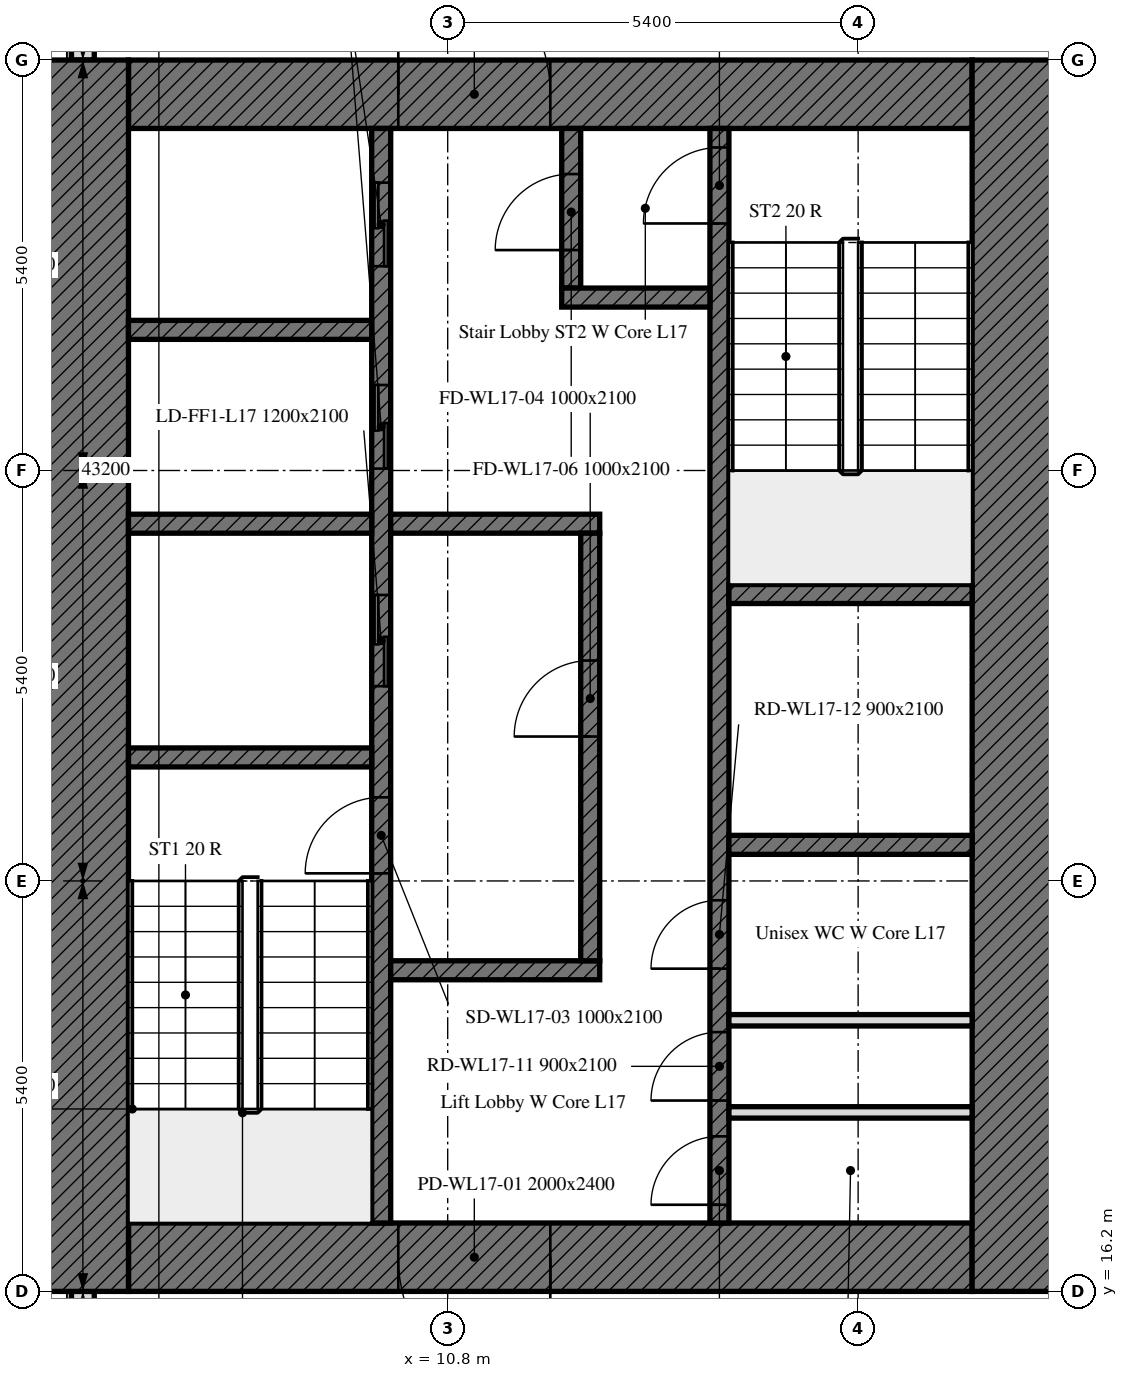
"""IFC4 building model, lengths in metres.
Left out: names, types, materials, properties, quantities, classifications, styles, units other than length and angle.
Written with IfcOpenShell. Run it as: python <this file> out.ifc"""

import sys

from ifc_helpers import new_model, si_unit, direction, frame, frame_2d, origin, place, context, subcontext, project, spatial, rectangle, extrude, element, fill, save


model = new_model("IFC4")
c1 = context("Model", 3, precision=1e-05, world=origin(), true_north=direction((0.0, 1.0)))
c2 = subcontext(c1, "Body", "Model", "MODEL_VIEW")
j1 = project(units=[si_unit("LENGTHUNIT", "METRE"), si_unit("PLANEANGLEUNIT", "RADIAN")], contexts=[c1])
p1 = place(None, origin())
s1 = spatial("IfcSite", under=j1, at=p1, CompositionType="ELEMENT")
p2 = place(p1, origin())
s2 = spatial("IfcBuilding", under=s1, at=p2, CompositionType="ELEMENT")
p3 = place(p2, frame((0.0, 0.0, 76.4)))
s3 = spatial("IfcBuildingStorey", under=s2, at=p3, CompositionType="ELEMENT", Elevation=76.4)
p4 = place(p3, frame((6.0, 43.014, 0.0), z_axis=(0.0, 0.0, 1.0), x_axis=(0.0, -1.0, 0.0)))
e1 = element("IfcWall", 1, at=p4, inside=s3, PredefinedType="SOLIDWALL", context=c2, shape_type="SweptSolid", body=[
    extrude(rectangle(XDim=10.614, YDim=0.3, at=frame_2d((5.307, 0.0))), origin(), (0.0, 0.0, 1.0), 3.5),
])
p5 = place(p4, frame((6.564, 0.0, 0.9)))
e2 = element("IfcOpeningElement", 2, at=p5, cuts=e1, PredefinedType="OPENING", context=c2, shape_type="SweptSolid", body=[
    extrude(rectangle(XDim=1.1, YDim=1.7, at=frame_2d((0.55, 0.85))), frame((0.0, 0.16, 0.0), z_axis=(0.0, -1.0, 0.0), x_axis=(1.0, 0.0, 0.0)), (0.0, 0.0, 1.0), 0.32),
])
p6 = place(p4, frame((8.164, 0.0, 0.9)))
e3 = element("IfcOpeningElement", 3, at=p6, cuts=e1, PredefinedType="OPENING", context=c2, shape_type="SweptSolid", body=[
    extrude(rectangle(XDim=1.1, YDim=1.7, at=frame_2d((0.55, 0.85))), frame((0.0, 0.16, 0.0), z_axis=(0.0, -1.0, 0.0), x_axis=(1.0, 0.0, 0.0)), (0.0, 0.0, 1.0), 0.32),
])
p7 = place(p3, frame((6.0, 16.2, 0.0), z_axis=(0.0, 0.0, 1.0), x_axis=(0.0, -1.0, 0.0)))
e4 = element("IfcWall", 4, at=p7, inside=s3, PredefinedType="SOLIDWALL", context=c2, shape_type="SweptSolid", body=[
    extrude(rectangle(XDim=5.214, YDim=0.3, at=frame_2d((2.607, 0.0))), origin(), (0.0, 0.0, 1.0), 3.5),
])
p8 = place(p7, frame((1.35, 0.0, 0.9)))
e5 = element("IfcOpeningElement", 5, at=p8, cuts=e4, PredefinedType="OPENING", context=c2, shape_type="SweptSolid", body=[
    extrude(rectangle(XDim=1.1, YDim=1.7, at=frame_2d((0.55, 0.85))), frame((0.0, 0.16, 0.0), z_axis=(0.0, -1.0, 0.0), x_axis=(1.0, 0.0, 0.0)), (0.0, 0.0, 1.0), 0.32),
])
p9 = place(p7, frame((2.95, 0.0, 0.9)))
e6 = element("IfcOpeningElement", 6, at=p9, cuts=e4, PredefinedType="OPENING", context=c2, shape_type="SweptSolid", body=[
    extrude(rectangle(XDim=1.1, YDim=1.7, at=frame_2d((0.55, 0.85))), frame((0.0, 0.16, 0.0), z_axis=(0.0, -1.0, 0.0), x_axis=(1.0, 0.0, 0.0)), (0.0, 0.0, 1.0), 0.32),
])
p10 = place(p3, frame((17.7, 16.65, 0.0), z_axis=(0.0, 0.0, 1.0), x_axis=(-1.0, 0.0, 0.0)))
e7 = element("IfcWall", 7, at=p10, inside=s3, PredefinedType="SOLIDWALL", context=c2, shape_type="SweptSolid", body=[
    extrude(rectangle(XDim=11.1, YDim=0.9, at=frame_2d((5.55, 0.0))), origin(), (0.0, 0.0, 1.0), 3.5),
])
p11 = place(p10, frame((5.55, 0.0, 0.0)))
e8 = element("IfcOpeningElement", 8, at=p11, cuts=e7, PredefinedType="OPENING", context=c2, shape_type="SweptSolid", body=[
    extrude(rectangle(XDim=2.0, YDim=2.4, at=frame_2d((1.0, 1.2))), frame((0.0, 0.45, 0.0), z_axis=(0.0, -1.0, 0.0), x_axis=(1.0, 0.0, 0.0)), (0.0, 0.0, 1.0), 0.9),
])
p12 = place(p3, frame((6.6, 31.95, 0.0), z_axis=(0.0, 0.0, 1.0), x_axis=(1.0, 0.0, 0.0)))
e9 = element("IfcWall", 9, at=p12, inside=s3, PredefinedType="SOLIDWALL", context=c2, shape_type="SweptSolid", body=[
    extrude(rectangle(XDim=11.1, YDim=0.9, at=frame_2d((5.55, 0.0))), origin(), (0.0, 0.0, 1.0), 3.5),
])
p13 = place(p12, frame((3.55, 0.0, 0.0)))
e10 = element("IfcOpeningElement", 10, at=p13, cuts=e9, PredefinedType="OPENING", context=c2, shape_type="SweptSolid", body=[
    extrude(rectangle(XDim=2.0, YDim=2.4, at=frame_2d((1.0, 1.2))), frame((0.0, 0.45, 0.0), z_axis=(0.0, -1.0, 0.0), x_axis=(1.0, 0.0, 0.0)), (0.0, 0.0, 1.0), 0.9),
])
for number, where, z_axis, x_axis in (
    (11, (6.0, 16.2, 0.0), (0.0, 0.0, 1.0), (0.0, 1.0, 0.0)),
    (12, (18.3, 32.4, 0.0), (0.0, 0.0, 1.0), (0.0, -1.0, 0.0)),
):
    element("IfcWall", number, at=place(p3, frame(where, z_axis=z_axis, x_axis=x_axis)), inside=s3, PredefinedType="SOLIDWALL", context=c2, shape_type="SweptSolid", body=[
        extrude(rectangle(XDim=16.2, YDim=1.2, at=frame_2d((8.1, 0.0))), origin(), (0.0, 0.0, 1.0), 3.5),
    ])
p14 = place(p3, frame((9.925, 17.1, 0.0), z_axis=(0.0, 0.0, 1.0), x_axis=(0.0, 1.0, 0.0)))
e13 = element("IfcWall", 13, at=p14, inside=s3, PredefinedType="SOLIDWALL", context=c2, shape_type="SweptSolid", body=[
    extrude(rectangle(XDim=14.4, YDim=0.25, at=frame_2d((7.2, 0.0))), origin(), (0.0, 0.0, 1.0), 3.5),
])
p15 = place(p14, frame((4.6, 0.0, 0.0)))
e14 = element("IfcOpeningElement", 14, at=p15, cuts=e13, PredefinedType="OPENING", context=c2, shape_type="SweptSolid", body=[
    extrude(rectangle(XDim=1.0, YDim=2.1, at=frame_2d((0.5, 1.05))), frame((0.0, 0.125, 0.0), z_axis=(0.0, -1.0, 0.0), x_axis=(1.0, 0.0, 0.0)), (0.0, 0.0, 1.0), 0.25),
])
p16 = place(p14, frame((7.062, 0.0, 0.0)))
e15 = element("IfcOpeningElement", 15, at=p16, cuts=e13, PredefinedType="OPENING", context=c2, shape_type="SweptSolid", body=[
    extrude(rectangle(XDim=1.2, YDim=2.1, at=frame_2d((0.6, 1.05))), frame((0.0, 0.125, 0.0), z_axis=(0.0, -1.0, 0.0), x_axis=(1.0, 0.0, 0.0)), (0.0, 0.0, 1.0), 0.25),
])
p17 = place(p14, frame((9.925, 0.0, 0.0)))
e16 = element("IfcOpeningElement", 16, at=p17, cuts=e13, PredefinedType="OPENING", context=c2, shape_type="SweptSolid", body=[
    extrude(rectangle(XDim=1.1, YDim=2.1, at=frame_2d((0.55, 1.05))), frame((0.0, 0.125, 0.0), z_axis=(0.0, -1.0, 0.0), x_axis=(1.0, 0.0, 0.0)), (0.0, 0.0, 1.0), 0.25),
])
p18 = place(p14, frame((12.587, 0.0, 0.0)))
e17 = element("IfcOpeningElement", 17, at=p18, cuts=e13, PredefinedType="OPENING", context=c2, shape_type="SweptSolid", body=[
    extrude(rectangle(XDim=1.1, YDim=2.1, at=frame_2d((0.55, 1.05))), frame((0.0, 0.125, 0.0), z_axis=(0.0, -1.0, 0.0), x_axis=(1.0, 0.0, 0.0)), (0.0, 0.0, 1.0), 0.25),
])
p19 = place(p3, frame((14.375, 17.1, 0.0), z_axis=(0.0, 0.0, 1.0), x_axis=(0.0, 1.0, 0.0)))
e18 = element("IfcWall", 18, at=p19, inside=s3, PredefinedType="SOLIDWALL", context=c2, shape_type="SweptSolid", body=[
    extrude(rectangle(XDim=14.4, YDim=0.25, at=frame_2d((7.2, 0.0))), origin(), (0.0, 0.0, 1.0), 3.5),
])
p20 = place(p19, frame((13.15, 0.0, 0.0)))
e19 = element("IfcOpeningElement", 19, at=p20, cuts=e18, PredefinedType="OPENING", context=c2, shape_type="SweptSolid", body=[
    extrude(rectangle(XDim=1.0, YDim=2.1, at=frame_2d((0.5, 1.05))), frame((0.0, 0.125, 0.0), z_axis=(0.0, -1.0, 0.0), x_axis=(1.0, 0.0, 0.0)), (0.0, 0.0, 1.0), 0.25),
])
p21 = place(p19, frame((0.24, 0.0, 0.0)))
e20 = element("IfcOpeningElement", 20, at=p21, cuts=e18, PredefinedType="OPENING", context=c2, shape_type="SweptSolid", body=[
    extrude(rectangle(XDim=0.9, YDim=2.1, at=frame_2d((0.45, 1.05))), frame((0.0, 0.125, 0.0), z_axis=(0.0, -1.0, 0.0), x_axis=(1.0, 0.0, 0.0)), (0.0, 0.0, 1.0), 0.25),
])
p22 = place(p19, frame((1.611, 0.0, 0.0)))
e21 = element("IfcOpeningElement", 21, at=p22, cuts=e18, PredefinedType="OPENING", context=c2, shape_type="SweptSolid", body=[
    extrude(rectangle(XDim=0.9, YDim=2.1, at=frame_2d((0.45, 1.05))), frame((0.0, 0.125, 0.0), z_axis=(0.0, -1.0, 0.0), x_axis=(1.0, 0.0, 0.0)), (0.0, 0.0, 1.0), 0.25),
])
p23 = place(p19, frame((3.346, 0.0, 0.0)))
e22 = element("IfcOpeningElement", 22, at=p23, cuts=e18, PredefinedType="OPENING", context=c2, shape_type="SweptSolid", body=[
    extrude(rectangle(XDim=0.9, YDim=2.1, at=frame_2d((0.45, 1.05))), frame((0.0, 0.125, 0.0), z_axis=(0.0, -1.0, 0.0), x_axis=(1.0, 0.0, 0.0)), (0.0, 0.0, 1.0), 0.25),
])
for number, where, z_axis, x_axis in (
    (23, (6.6, 23.225, 0.0), (0.0, 0.0, 1.0), (1.0, 0.0, 0.0)),
    (24, (14.5, 25.375, 0.0), (0.0, 0.0, 1.0), (1.0, 0.0, 0.0)),
    (25, (14.5, 22.075, 0.0), (0.0, 0.0, 1.0), (1.0, 0.0, 0.0)),
    (26, (6.6, 26.3, 0.0), (0.0, 0.0, 1.0), (1.0, 0.0, 0.0)),
):
    element("IfcWall", number, at=place(p3, frame(where, z_axis=z_axis, x_axis=x_axis)), inside=s3, PredefinedType="SOLIDWALL", context=c2, shape_type="SweptSolid", body=[
        extrude(rectangle(XDim=3.2, YDim=0.25, at=frame_2d((1.6, 0.0))), origin(), (0.0, 0.0, 1.0), 3.5),
    ])
for number, where, z_axis, x_axis in (
    (27, (10.05, 26.3, 0.0), (0.0, 0.0, 1.0), (1.0, 0.0, 0.0)),
    (28, (10.05, 20.425, 0.0), (0.0, 0.0, 1.0), (1.0, 0.0, 0.0)),
):
    element("IfcWall", number, at=place(p3, frame(where, z_axis=z_axis, x_axis=x_axis)), inside=s3, PredefinedType="SOLIDWALL", context=c2, shape_type="SweptSolid", body=[
        extrude(rectangle(XDim=2.75, YDim=0.25, at=frame_2d((1.375, 0.0))), origin(), (0.0, 0.0, 1.0), 3.5),
    ])
p24 = place(p3, frame((12.425, 29.4, 0.0), z_axis=(0.0, 0.0, 1.0), x_axis=(0.0, 1.0, 0.0)))
e29 = element("IfcWall", 29, at=p24, inside=s3, PredefinedType="SOLIDWALL", context=c2, shape_type="SweptSolid", body=[
    extrude(rectangle(XDim=2.1, YDim=0.25, at=frame_2d((1.05, 0.0))), origin(), (0.0, 0.0, 1.0), 3.5),
])
p25 = place(p24, frame((0.5, 0.0, 0.0)))
e30 = element("IfcOpeningElement", 30, at=p25, cuts=e29, PredefinedType="OPENING", context=c2, shape_type="SweptSolid", body=[
    extrude(rectangle(XDim=1.0, YDim=2.1, at=frame_2d((0.5, 1.05))), frame((0.0, 0.125, 0.0), z_axis=(0.0, -1.0, 0.0), x_axis=(1.0, 0.0, 0.0)), (0.0, 0.0, 1.0), 0.25),
])
p26 = place(p3, frame((12.3, 29.275, 0.0), z_axis=(0.0, 0.0, 1.0), x_axis=(1.0, 0.0, 0.0)))
e31 = element("IfcWall", 31, at=p26, inside=s3, PredefinedType="SOLIDWALL", context=c2, shape_type="SweptSolid", body=[
    extrude(rectangle(XDim=1.95, YDim=0.25, at=frame_2d((0.975, 0.0))), origin(), (0.0, 0.0, 1.0), 3.5),
])
p27 = place(p3, frame((12.675, 20.55, 0.0), z_axis=(0.0, 0.0, 1.0), x_axis=(0.0, 1.0, 0.0)))
e32 = element("IfcWall", 32, at=p27, inside=s3, PredefinedType="SOLIDWALL", context=c2, shape_type="SweptSolid", body=[
    extrude(rectangle(XDim=5.625, YDim=0.25, at=frame_2d((2.812, 0.0))), origin(), (0.0, 0.0, 1.0), 3.5),
])
p28 = place(p27, frame((2.95, 0.0, 0.0)))
e33 = element("IfcOpeningElement", 33, at=p28, cuts=e32, PredefinedType="OPENING", context=c2, shape_type="SweptSolid", body=[
    extrude(rectangle(XDim=1.0, YDim=2.1, at=frame_2d((0.5, 1.05))), frame((0.0, 0.125, 0.0), z_axis=(0.0, -1.0, 0.0), x_axis=(1.0, 0.0, 0.0)), (0.0, 0.0, 1.0), 0.25),
])
p29 = place(p3, frame((6.6, 28.85, 0.0), z_axis=(0.0, 0.0, 1.0), x_axis=(1.0, 0.0, 0.0)))
e34 = element("IfcWall", 34, at=p29, inside=s3, PredefinedType="SOLIDWALL", context=c2, shape_type="SweptSolid", body=[
    extrude(rectangle(XDim=3.2, YDim=0.25, at=frame_2d((1.6, 0.0))), origin(), (0.0, 0.0, 1.0), 3.5),
])
for number, where, z_axis, x_axis in (
    (35, (14.5, 18.555, 0.0), (0.0, 0.0, 1.0), (1.0, 0.0, 0.0)),
    (36, (14.5, 19.767, 0.0), (0.0, 0.0, 1.0), (1.0, 0.0, 0.0)),
):
    element("IfcWall", number, at=place(p3, frame(where, z_axis=z_axis, x_axis=x_axis)), inside=s3, PredefinedType="PARTITIONING", context=c2, shape_type="SweptSolid", body=[
        extrude(rectangle(XDim=3.2, YDim=0.15, at=frame_2d((1.6, 0.0))), origin(), (0.0, 0.0, 1.0), 3.5),
    ])
p30 = place(p11, origin())
e37 = element("IfcDoor", 37, at=p30, inside=s3, OperationType="DOUBLE_DOOR_SINGLE_SWING", PredefinedType="DOOR", context=c2, shape_type="SweptSolid", body=[
    extrude(rectangle(XDim=2.0, YDim=2.4, at=frame_2d((1.0, 1.2))), frame((0.0, 0.025, 0.0), z_axis=(0.0, -1.0, 0.0), x_axis=(1.0, 0.0, 0.0)), (0.0, 0.0, 1.0), 0.05),
])
fill(e8, e37)
p31 = place(p13, origin())
e38 = element("IfcDoor", 38, at=p31, inside=s3, OperationType="DOUBLE_DOOR_SINGLE_SWING", PredefinedType="DOOR", context=c2, shape_type="SweptSolid", body=[
    extrude(rectangle(XDim=2.0, YDim=2.4, at=frame_2d((1.0, 1.2))), frame((0.0, 0.025, 0.0), z_axis=(0.0, -1.0, 0.0), x_axis=(1.0, 0.0, 0.0)), (0.0, 0.0, 1.0), 0.05),
])
fill(e10, e38)
p32 = place(p15, origin())
e39 = element("IfcDoor", 39, at=p32, inside=s3, OperationType="SINGLE_SWING_LEFT", PredefinedType="DOOR", context=c2, shape_type="SweptSolid", body=[
    extrude(rectangle(XDim=1.0, YDim=2.1, at=frame_2d((0.5, 1.05))), frame((0.0, 0.025, 0.0), z_axis=(0.0, -1.0, 0.0), x_axis=(1.0, 0.0, 0.0)), (0.0, 0.0, 1.0), 0.05),
])
fill(e14, e39)
p33 = place(p28, origin())
e40 = element("IfcDoor", 40, at=p33, inside=s3, OperationType="SINGLE_SWING_LEFT", PredefinedType="DOOR", context=c2, shape_type="SweptSolid", body=[
    extrude(rectangle(XDim=1.0, YDim=2.1, at=frame_2d((0.5, 1.05))), frame((0.0, 0.025, 0.0), z_axis=(0.0, -1.0, 0.0), x_axis=(1.0, 0.0, 0.0)), (0.0, 0.0, 1.0), 0.05),
])
fill(e33, e40)
p34 = place(p20, origin())
e41 = element("IfcDoor", 41, at=p34, inside=s3, OperationType="SINGLE_SWING_LEFT", PredefinedType="DOOR", context=c2, shape_type="SweptSolid", body=[
    extrude(rectangle(XDim=1.0, YDim=2.1, at=frame_2d((0.5, 1.05))), frame((0.0, 0.025, 0.0), z_axis=(0.0, -1.0, 0.0), x_axis=(1.0, 0.0, 0.0)), (0.0, 0.0, 1.0), 0.05),
])
fill(e19, e41)
p35 = place(p25, origin())
e42 = element("IfcDoor", 42, at=p35, inside=s3, OperationType="SINGLE_SWING_LEFT", PredefinedType="DOOR", context=c2, shape_type="SweptSolid", body=[
    extrude(rectangle(XDim=1.0, YDim=2.1, at=frame_2d((0.5, 1.05))), frame((0.0, 0.025, 0.0), z_axis=(0.0, -1.0, 0.0), x_axis=(1.0, 0.0, 0.0)), (0.0, 0.0, 1.0), 0.05),
])
fill(e30, e42)
p36 = place(p16, origin())
e43 = element("IfcDoor", 43, at=p36, inside=s3, OperationType="DOUBLE_DOOR_SLIDING", PredefinedType="DOOR", context=c2, shape_type="SweptSolid", body=[
    extrude(rectangle(XDim=1.2, YDim=2.1, at=frame_2d((0.6, 1.05))), frame((0.0, 0.025, 0.0), z_axis=(0.0, -1.0, 0.0), x_axis=(1.0, 0.0, 0.0)), (0.0, 0.0, 1.0), 0.05),
])
fill(e15, e43)
p37 = place(p17, origin())
e44 = element("IfcDoor", 44, at=p37, inside=s3, OperationType="DOUBLE_DOOR_SLIDING", PredefinedType="DOOR", context=c2, shape_type="SweptSolid", body=[
    extrude(rectangle(XDim=1.1, YDim=2.1, at=frame_2d((0.55, 1.05))), frame((0.0, 0.025, 0.0), z_axis=(0.0, -1.0, 0.0), x_axis=(1.0, 0.0, 0.0)), (0.0, 0.0, 1.0), 0.05),
])
fill(e16, e44)
p38 = place(p18, origin())
e45 = element("IfcDoor", 45, at=p38, inside=s3, OperationType="DOUBLE_DOOR_SLIDING", PredefinedType="DOOR", context=c2, shape_type="SweptSolid", body=[
    extrude(rectangle(XDim=1.1, YDim=2.1, at=frame_2d((0.55, 1.05))), frame((0.0, 0.025, 0.0), z_axis=(0.0, -1.0, 0.0), x_axis=(1.0, 0.0, 0.0)), (0.0, 0.0, 1.0), 0.05),
])
fill(e17, e45)
p39 = place(p21, origin())
e46 = element("IfcDoor", 46, at=p39, inside=s3, OperationType="SINGLE_SWING_LEFT", PredefinedType="DOOR", context=c2, shape_type="SweptSolid", body=[
    extrude(rectangle(XDim=0.9, YDim=2.1, at=frame_2d((0.45, 1.05))), frame((0.0, 0.025, 0.0), z_axis=(0.0, -1.0, 0.0), x_axis=(1.0, 0.0, 0.0)), (0.0, 0.0, 1.0), 0.05),
])
fill(e20, e46)
p40 = place(p22, origin())
e47 = element("IfcDoor", 47, at=p40, inside=s3, OperationType="SINGLE_SWING_LEFT", PredefinedType="DOOR", context=c2, shape_type="SweptSolid", body=[
    extrude(rectangle(XDim=0.9, YDim=2.1, at=frame_2d((0.45, 1.05))), frame((0.0, 0.025, 0.0), z_axis=(0.0, -1.0, 0.0), x_axis=(1.0, 0.0, 0.0)), (0.0, 0.0, 1.0), 0.05),
])
fill(e21, e47)
p41 = place(p23, origin())
e48 = element("IfcDoor", 48, at=p41, inside=s3, OperationType="SINGLE_SWING_LEFT", PredefinedType="DOOR", context=c2, shape_type="SweptSolid", body=[
    extrude(rectangle(XDim=0.9, YDim=2.1, at=frame_2d((0.45, 1.05))), frame((0.0, 0.025, 0.0), z_axis=(0.0, -1.0, 0.0), x_axis=(1.0, 0.0, 0.0)), (0.0, 0.0, 1.0), 0.05),
])
fill(e22, e48)
save(model, sys.argv[1])
